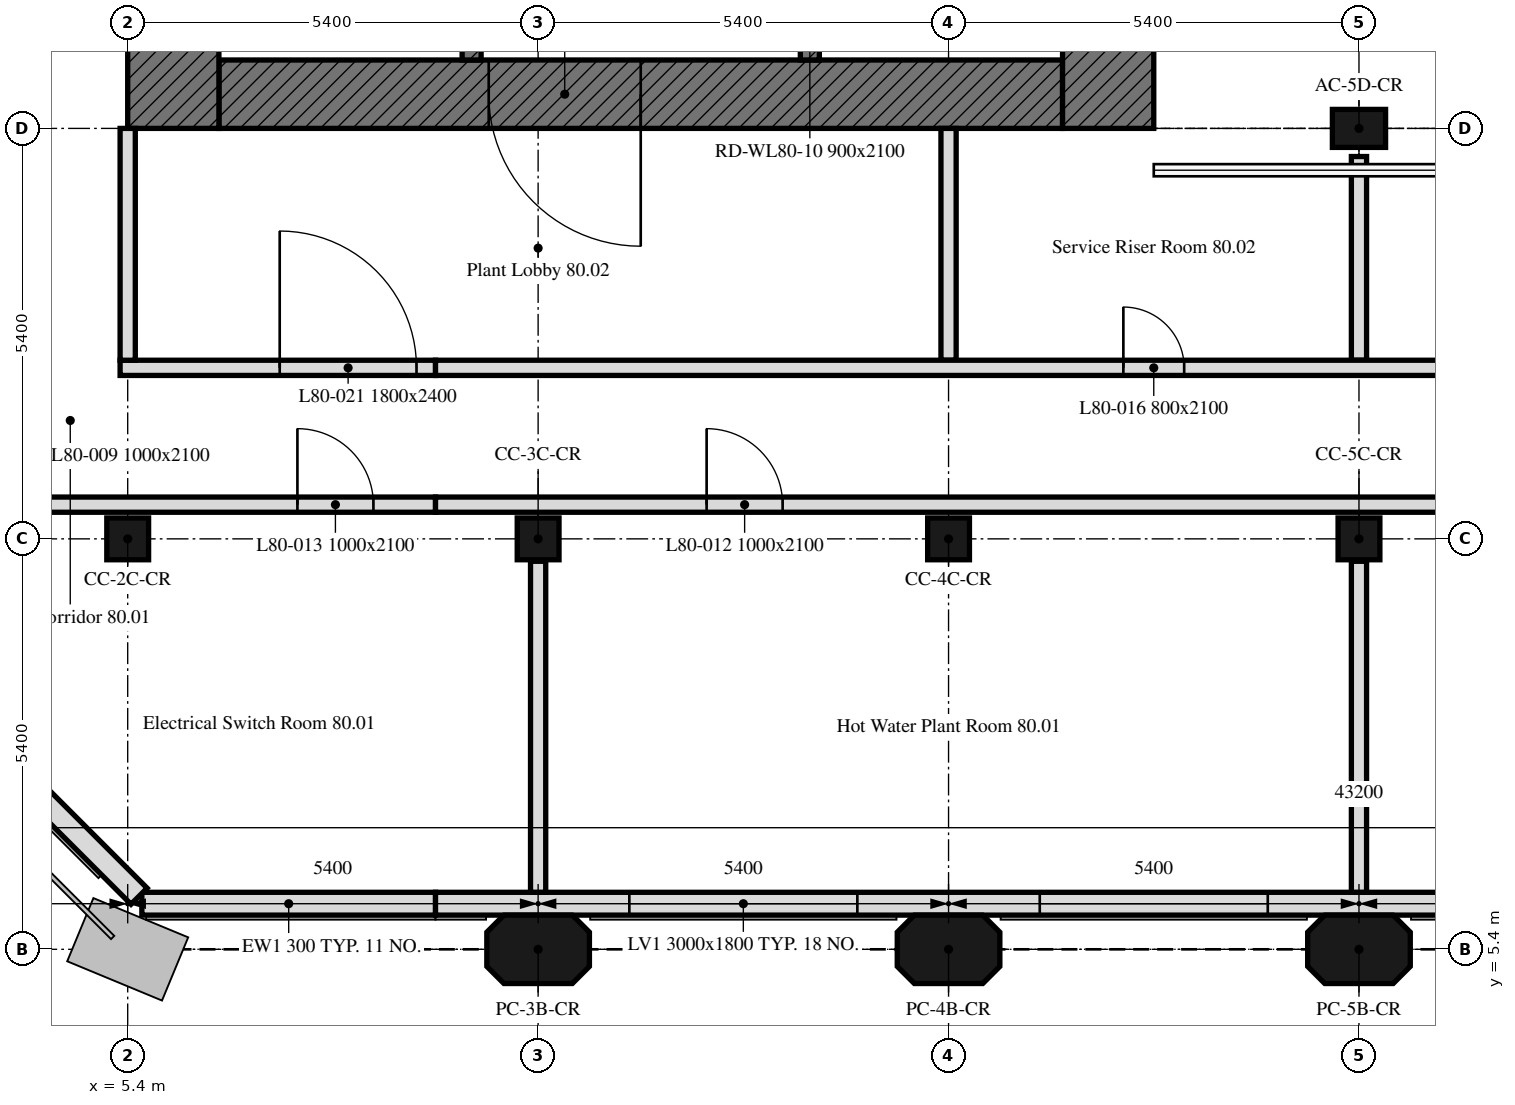
"""IFC4 building model, lengths in metres.
Left out: names, types, materials, properties, quantities, classifications, styles, units other than length and angle.
Written with IfcOpenShell. Run it as: python <this file> out.ifc"""

import sys

from ifc_helpers import new_model, si_unit, direction, frame, frame_2d, origin, origin_2d, place, context, subcontext, project, spatial, polyline, rectangle, outline, extrude, element, fill, save


model = new_model("IFC4")
c1 = context("Model", 3, precision=1e-05, world=origin(), true_north=direction((0.0, 1.0)))
c2 = subcontext(c1, "Body", "Model", "MODEL_VIEW")
j1 = project(units=[si_unit("LENGTHUNIT", "METRE"), si_unit("PLANEANGLEUNIT", "RADIAN")], contexts=[c1])
p1 = place(None, origin())
s1 = spatial("IfcSite", under=j1, at=p1, CompositionType="ELEMENT")
p2 = place(p1, origin())
s2 = spatial("IfcBuilding", under=s1, at=p2, CompositionType="ELEMENT")
p3 = place(p2, frame((0.0, 0.0, 321.7)))
s3 = spatial("IfcBuildingStorey", under=s2, at=p3, CompositionType="ELEMENT", Elevation=321.7)
for number, where, z_axis, x_axis in (
    (1, (10.8, 5.4, 0.0), (0.0, 0.0, 1.0), (1.0, 0.0, 0.0)),
    (2, (16.2, 5.4, 0.0), (0.0, 0.0, 1.0), (1.0, 0.0, 0.0)),
    (3, (21.6, 5.4, 0.0), (0.0, 0.0, 1.0), (1.0, 0.0, 0.0)),
):
    element("IfcColumn", number, at=place(p3, frame(where, z_axis=z_axis, x_axis=x_axis)), inside=s3, PredefinedType="COLUMN", context=c2, shape_type="SweptSolid", body=[
        extrude(outline(polyline([(-0.45, -0.45), (0.45, -0.45), (0.675, -0.225), (0.675, 0.225), (0.45, 0.45), (-0.45, 0.45), (-0.675, 0.225), (-0.675, -0.225), (-0.45, -0.45)])), origin(), (0.0, 0.0, 1.0), 4.2),
    ])
for number, where, z_axis, x_axis in (
    (4, (5.4, 10.8, 0.0), (0.0, 0.0, 1.0), (1.0, 0.0, 0.0)),
    (5, (10.8, 10.8, 0.0), (0.0, 0.0, 1.0), (1.0, 0.0, 0.0)),
    (6, (16.2, 10.8, 0.0), (0.0, 0.0, 1.0), (1.0, 0.0, 0.0)),
    (7, (21.6, 10.8, 0.0), (0.0, 0.0, 1.0), (1.0, 0.0, 0.0)),
):
    element("IfcColumn", number, at=place(p3, frame(where, z_axis=z_axis, x_axis=x_axis)), inside=s3, PredefinedType="COLUMN", context=c2, shape_type="SweptSolid", body=[
        extrude(rectangle(XDim=0.55, YDim=0.55, at=origin_2d()), origin(), (0.0, 0.0, 1.0), 4.2),
    ])
p4 = place(p3, frame((21.6, 16.2, 0.0), z_axis=(0.0, 0.0, 1.0), x_axis=(1.0, 0.0, 0.0)))
e8 = element("IfcColumn", 8, at=p4, inside=s3, PredefinedType="COLUMN", context=c2, shape_type="SweptSolid", body=[
    extrude(rectangle(XDim=0.7, YDim=0.5, at=origin_2d()), origin(), (0.0, 0.0, 1.0), 4.2),
])
p5 = place(p3, frame((5.586, 6.0, 0.0), z_axis=(0.0, 0.0, 1.0), x_axis=(1.0, 0.0, 0.0)))
e9 = element("IfcWall", 9, at=p5, inside=s3, PredefinedType="SOLIDWALL", context=c2, shape_type="SweptSolid", body=[
    extrude(outline(polyline([(0.0, 0.0), (3.864, 0.0), (3.864, 4.2), (3.312, 6.955), (2.76, 6.709), (2.208, 6.464), (1.656, 6.219), (1.104, 5.973), (0.552, 5.728), (0.0, 5.483), (0.0, 0.0)])), frame((0.0, 0.15, 0.0), z_axis=(0.0, -1.0, 0.0), x_axis=(1.0, 0.0, 0.0)), (0.0, 0.0, 1.0), 0.3),
])
p6 = place(p3, frame((9.45, 6.0, 0.0), z_axis=(0.0, 0.0, 1.0), x_axis=(1.0, 0.0, 0.0)))
e10 = element("IfcWall", 10, at=p6, inside=s3, PredefinedType="SOLIDWALL", context=c2, shape_type="SweptSolid", body=[
    extrude(outline(polyline([(0.0, 0.0), (28.164, 0.0), (28.164, 4.2), (27.564, 4.2), (26.965, 4.2), (26.366, 4.2), (25.767, 4.2), (25.167, 4.2), (24.568, 4.2), (23.969, 4.2), (23.37, 4.2), (22.771, 4.2), (22.171, 4.2), (21.572, 4.2), (20.973, 4.2), (20.374, 4.2), (19.774, 4.2), (19.175, 4.2), (18.576, 4.2), (17.977, 4.2), (17.377, 4.2), (16.778, 4.2), (16.179, 4.2), (15.58, 4.2), (14.981, 4.2), (14.381, 4.2), (13.782, 4.2), (13.183, 4.2), (12.584, 4.2), (11.985, 4.2), (11.385, 4.2), (10.786, 4.2), (10.187, 4.2), (9.588, 4.2), (8.988, 4.2), (8.389, 4.2), (7.79, 4.2), (7.191, 4.2), (6.592, 4.2), (5.992, 4.2), (5.393, 4.2), (4.794, 4.2), (4.195, 4.2), (3.595, 4.2), (2.996, 4.2), (2.397, 4.2), (1.798, 4.2), (1.198, 4.2), (0.599, 4.2), (0.0, 4.2), (0.0, 0.0)])), frame((0.0, 0.15, 0.0), z_axis=(0.0, -1.0, 0.0), x_axis=(1.0, 0.0, 0.0)), (0.0, 0.0, 1.0), 0.3),
])
p7 = place(p6, frame((2.55, 0.0, 0.6)))
e11 = element("IfcOpeningElement", 11, at=p7, cuts=e10, PredefinedType="OPENING", context=c2, shape_type="SweptSolid", body=[
    extrude(rectangle(XDim=3.0, YDim=1.8, at=frame_2d((1.5, 0.9))), frame((0.0, 0.16, 0.0), z_axis=(0.0, -1.0, 0.0), x_axis=(1.0, 0.0, 0.0)), (0.0, 0.0, 1.0), 0.32),
])
p8 = place(p6, frame((7.95, 0.0, 0.6)))
e12 = element("IfcOpeningElement", 12, at=p8, cuts=e10, PredefinedType="OPENING", context=c2, shape_type="SweptSolid", body=[
    extrude(rectangle(XDim=3.0, YDim=1.8, at=frame_2d((1.5, 0.9))), frame((0.0, 0.16, 0.0), z_axis=(0.0, -1.0, 0.0), x_axis=(1.0, 0.0, 0.0)), (0.0, 0.0, 1.0), 0.32),
])
p9 = place(p6, frame((13.35, 0.0, 0.6)))
e13 = element("IfcOpeningElement", 13, at=p9, cuts=e10, PredefinedType="OPENING", context=c2, shape_type="SweptSolid", body=[
    extrude(rectangle(XDim=3.0, YDim=1.8, at=frame_2d((1.5, 0.9))), frame((0.0, 0.16, 0.0), z_axis=(0.0, -1.0, 0.0), x_axis=(1.0, 0.0, 0.0)), (0.0, 0.0, 1.0), 0.32),
])
p10 = place(p6, frame((18.75, 0.0, 0.6)))
e14 = element("IfcOpeningElement", 14, at=p10, cuts=e10, PredefinedType="OPENING", context=c2, shape_type="SweptSolid", body=[
    extrude(rectangle(XDim=3.0, YDim=1.8, at=frame_2d((1.5, 0.9))), frame((0.0, 0.16, 0.0), z_axis=(0.0, -1.0, 0.0), x_axis=(1.0, 0.0, 0.0)), (0.0, 0.0, 1.0), 0.32),
])
p11 = place(p6, frame((24.15, 0.0, 0.6)))
e15 = element("IfcOpeningElement", 15, at=p11, cuts=e10, PredefinedType="OPENING", context=c2, shape_type="SweptSolid", body=[
    extrude(rectangle(XDim=3.0, YDim=1.8, at=frame_2d((1.5, 0.9))), frame((0.0, 0.16, 0.0), z_axis=(0.0, -1.0, 0.0), x_axis=(1.0, 0.0, 0.0)), (0.0, 0.0, 1.0), 0.32),
])
p12 = place(p3, frame((0.699, 10.949, 0.0), z_axis=(0.0, 0.0, 1.0), x_axis=(0.707106781187, -0.707106781187, 0.0)))
e16 = element("IfcWall", 16, at=p12, inside=s3, PredefinedType="SOLIDWALL", context=c2, shape_type="SweptSolid", body=[
    extrude(outline(polyline([(0.0, 0.0), (6.86, 0.0), (6.86, 5.467), (6.288, 5.287), (5.716, 5.107), (5.145, 4.927), (4.573, 4.748), (4.001, 4.568), (3.43, 4.389), (2.858, 4.209), (2.287, 4.029), (1.715, 3.85), (1.143, 3.67), (0.572, 3.49), (0.0, 3.311), (0.0, 0.0)])), frame((0.0, 0.15, 0.0), z_axis=(0.0, -1.0, 0.0), x_axis=(1.0, 0.0, 0.0)), (0.0, 0.0, 1.0), 0.3),
])
p13 = place(p3, frame((17.7, 16.65, 0.0), z_axis=(0.0, 0.0, 1.0), x_axis=(-1.0, 0.0, 0.0)))
e17 = element("IfcWall", 17, at=p13, inside=s3, PredefinedType="SOLIDWALL", context=c2, shape_type="SweptSolid", body=[
    extrude(outline(polyline([(0.0, 0.0), (11.1, 0.0), (11.1, 5.933), (0.0, 4.2), (0.0, 0.0)])), frame((0.0, 0.45, 0.0), z_axis=(0.0, -1.0, 0.0), x_axis=(1.0, 0.0, 0.0)), (0.0, 0.0, 1.0), 0.9),
])
p14 = place(p13, frame((5.55, 0.0, 0.0)))
e18 = element("IfcOpeningElement", 18, at=p14, cuts=e17, PredefinedType="OPENING", context=c2, shape_type="SweptSolid", body=[
    extrude(rectangle(XDim=2.0, YDim=2.4, at=frame_2d((1.0, 1.2))), frame((0.0, 0.45, 0.0), z_axis=(0.0, -1.0, 0.0), x_axis=(1.0, 0.0, 0.0)), (0.0, 0.0, 1.0), 0.9),
])
p15 = place(p3, frame((6.0, 16.2, 0.0), z_axis=(0.0, 0.0, 1.0), x_axis=(0.0, 1.0, 0.0)))
e19 = element("IfcWall", 19, at=p15, inside=s3, PredefinedType="SOLIDWALL", context=c2, shape_type="SweptSolid", body=[
    extrude(rectangle(XDim=16.2, YDim=1.2, at=frame_2d((8.1, 0.0))), origin(), (0.0, 0.0, 1.0), 5.667),
])
p16 = place(p3, frame((18.3, 32.4, 0.0), z_axis=(0.0, 0.0, 1.0), x_axis=(0.0, -1.0, 0.0)))
e20 = element("IfcWall", 20, at=p16, inside=s3, PredefinedType="SOLIDWALL", context=c2, shape_type="SweptSolid", body=[
    extrude(rectangle(XDim=16.2, YDim=1.2, at=frame_2d((8.1, 0.0))), origin(), (0.0, 0.0, 1.0), 4.2),
])
p17 = place(p3, frame((9.925, 17.1, 0.0), z_axis=(0.0, 0.0, 1.0), x_axis=(0.0, 1.0, 0.0)))
e21 = element("IfcWall", 21, at=p17, inside=s3, PredefinedType="SOLIDWALL", context=c2, shape_type="SweptSolid", body=[
    extrude(rectangle(XDim=14.4, YDim=0.25, at=frame_2d((7.2, 0.0))), origin(), (0.0, 0.0, 1.0), 4.2),
])
p18 = place(p17, frame((4.6, 0.0, 0.0)))
e22 = element("IfcOpeningElement", 22, at=p18, cuts=e21, PredefinedType="OPENING", context=c2, shape_type="SweptSolid", body=[
    extrude(rectangle(XDim=1.0, YDim=2.1, at=frame_2d((0.5, 1.05))), frame((0.0, 0.125, 0.0), z_axis=(0.0, -1.0, 0.0), x_axis=(1.0, 0.0, 0.0)), (0.0, 0.0, 1.0), 0.25),
])
p19 = place(p17, frame((7.062, 0.0, 0.0)))
e23 = element("IfcOpeningElement", 23, at=p19, cuts=e21, PredefinedType="OPENING", context=c2, shape_type="SweptSolid", body=[
    extrude(rectangle(XDim=1.2, YDim=2.1, at=frame_2d((0.6, 1.05))), frame((0.0, 0.125, 0.0), z_axis=(0.0, -1.0, 0.0), x_axis=(1.0, 0.0, 0.0)), (0.0, 0.0, 1.0), 0.25),
])
p20 = place(p17, frame((10.106, 0.0, 0.0)))
e24 = element("IfcOpeningElement", 24, at=p20, cuts=e21, PredefinedType="OPENING", context=c2, shape_type="SweptSolid", body=[
    extrude(rectangle(XDim=0.9, YDim=2.1, at=frame_2d((0.45, 1.05))), frame((0.0, 0.125, 0.0), z_axis=(0.0, -1.0, 0.0), x_axis=(1.0, 0.0, 0.0)), (0.0, 0.0, 1.0), 0.25),
])
p21 = place(p17, frame((12.719, 0.0, 0.0)))
e25 = element("IfcOpeningElement", 25, at=p21, cuts=e21, PredefinedType="OPENING", context=c2, shape_type="SweptSolid", body=[
    extrude(rectangle(XDim=0.9, YDim=2.1, at=frame_2d((0.45, 1.05))), frame((0.0, 0.125, 0.0), z_axis=(0.0, -1.0, 0.0), x_axis=(1.0, 0.0, 0.0)), (0.0, 0.0, 1.0), 0.25),
])
p22 = place(p3, frame((14.375, 17.1, 0.0), z_axis=(0.0, 0.0, 1.0), x_axis=(0.0, 1.0, 0.0)))
e26 = element("IfcWall", 26, at=p22, inside=s3, PredefinedType="SOLIDWALL", context=c2, shape_type="SweptSolid", body=[
    extrude(rectangle(XDim=14.4, YDim=0.25, at=frame_2d((7.2, 0.0))), origin(), (0.0, 0.0, 1.0), 4.2),
])
p23 = place(p22, frame((13.15, 0.0, 0.0)))
e27 = element("IfcOpeningElement", 27, at=p23, cuts=e26, PredefinedType="OPENING", context=c2, shape_type="SweptSolid", body=[
    extrude(rectangle(XDim=1.0, YDim=2.1, at=frame_2d((0.5, 1.05))), frame((0.0, 0.125, 0.0), z_axis=(0.0, -1.0, 0.0), x_axis=(1.0, 0.0, 0.0)), (0.0, 0.0, 1.0), 0.25),
])
p24 = place(p22, frame((0.24, 0.0, 0.0)))
e28 = element("IfcOpeningElement", 28, at=p24, cuts=e26, PredefinedType="OPENING", context=c2, shape_type="SweptSolid", body=[
    extrude(rectangle(XDim=0.9, YDim=2.1, at=frame_2d((0.45, 1.05))), frame((0.0, 0.125, 0.0), z_axis=(0.0, -1.0, 0.0), x_axis=(1.0, 0.0, 0.0)), (0.0, 0.0, 1.0), 0.25),
])
p25 = place(p22, frame((2.74, 0.0, 0.0)))
e29 = element("IfcOpeningElement", 29, at=p25, cuts=e26, PredefinedType="OPENING", context=c2, shape_type="SweptSolid", body=[
    extrude(rectangle(XDim=0.9, YDim=2.1, at=frame_2d((0.45, 1.05))), frame((0.0, 0.125, 0.0), z_axis=(0.0, -1.0, 0.0), x_axis=(1.0, 0.0, 0.0)), (0.0, 0.0, 1.0), 0.25),
])
p26 = place(p22, frame((6.175, 0.0, 0.0)))
e30 = element("IfcOpeningElement", 30, at=p26, cuts=e26, PredefinedType="OPENING", context=c2, shape_type="SweptSolid", body=[
    extrude(rectangle(XDim=0.9, YDim=2.1, at=frame_2d((0.45, 1.05))), frame((0.0, 0.125, 0.0), z_axis=(0.0, -1.0, 0.0), x_axis=(1.0, 0.0, 0.0)), (0.0, 0.0, 1.0), 0.25),
])
for number, where, z_axis, x_axis in (
    (31, (21.6, 10.505, 0.0), (0.0, 0.0, 1.0), (0.0, -1.0, 0.0)),
    (32, (10.8, 10.505, 0.0), (0.0, 0.0, 1.0), (0.0, -1.0, 0.0)),
):
    element("IfcWall", number, at=place(p3, frame(where, z_axis=z_axis, x_axis=x_axis)), inside=s3, PredefinedType="PARTITIONING", context=c2, shape_type="SweptSolid", body=[
        extrude(rectangle(XDim=4.354, YDim=0.2, at=frame_2d((2.177, 0.0))), origin(), (0.0, 0.0, 1.0), 4.2),
    ])
p27 = place(p3, frame((0.751, 11.25, 0.0), z_axis=(0.0, 0.0, 1.0), x_axis=(1.0, 0.0, 0.0)))
e33 = element("IfcWall", 33, at=p27, inside=s3, PredefinedType="PARTITIONING", context=c2, shape_type="SweptSolid", body=[
    extrude(outline(polyline([(0.0, 0.0), (8.699, 0.0), (8.699, 4.2), (0.0, 3.334), (0.0, 0.0)])), frame((0.0, 0.1, 0.0), z_axis=(0.0, -1.0, 0.0), x_axis=(1.0, 0.0, 0.0)), (0.0, 0.0, 1.0), 0.2),
])
p28 = place(p27, frame((6.882, 0.0, 0.0)))
e34 = element("IfcOpeningElement", 34, at=p28, cuts=e33, PredefinedType="OPENING", context=c2, shape_type="SweptSolid", body=[
    extrude(rectangle(XDim=1.0, YDim=2.1, at=frame_2d((0.5, 1.05))), frame((0.0, 0.1, 0.0), z_axis=(0.0, -1.0, 0.0), x_axis=(1.0, 0.0, 0.0)), (0.0, 0.0, 1.0), 0.2),
])
p29 = place(p3, frame((9.45, 11.25, 0.0), z_axis=(0.0, 0.0, 1.0), x_axis=(1.0, 0.0, 0.0)))
e35 = element("IfcWall", 35, at=p29, inside=s3, PredefinedType="PARTITIONING", context=c2, shape_type="SweptSolid", body=[
    extrude(rectangle(XDim=32.999, YDim=0.2, at=frame_2d((16.5, 0.0))), origin(), (0.0, 0.0, 1.0), 4.2),
])
p30 = place(p29, frame((25.167, 0.0, 0.0)))
e36 = element("IfcOpeningElement", 36, at=p30, cuts=e35, PredefinedType="OPENING", context=c2, shape_type="SweptSolid", body=[
    extrude(rectangle(XDim=1.0, YDim=2.1, at=frame_2d((0.5, 1.05))), frame((0.0, 0.1, 0.0), z_axis=(0.0, -1.0, 0.0), x_axis=(1.0, 0.0, 0.0)), (0.0, 0.0, 1.0), 0.2),
])
p31 = place(p29, frame((19.733, 0.0, 0.0)))
e37 = element("IfcOpeningElement", 37, at=p31, cuts=e35, PredefinedType="OPENING", context=c2, shape_type="SweptSolid", body=[
    extrude(rectangle(XDim=1.0, YDim=2.1, at=frame_2d((0.5, 1.05))), frame((0.0, 0.1, 0.0), z_axis=(0.0, -1.0, 0.0), x_axis=(1.0, 0.0, 0.0)), (0.0, 0.0, 1.0), 0.2),
])
p32 = place(p29, frame((3.567, 0.0, 0.0)))
e38 = element("IfcOpeningElement", 38, at=p32, cuts=e35, PredefinedType="OPENING", context=c2, shape_type="SweptSolid", body=[
    extrude(rectangle(XDim=1.0, YDim=2.1, at=frame_2d((0.5, 1.05))), frame((0.0, 0.1, 0.0), z_axis=(0.0, -1.0, 0.0), x_axis=(1.0, 0.0, 0.0)), (0.0, 0.0, 1.0), 0.2),
])
p33 = place(p3, frame((21.6, 15.83, 0.0), z_axis=(0.0, 0.0, 1.0), x_axis=(0.0, -1.0, 0.0)))
e39 = element("IfcWall", 39, at=p33, inside=s3, PredefinedType="PARTITIONING", context=c2, shape_type="SweptSolid", body=[
    extrude(rectangle(XDim=2.68, YDim=0.2, at=frame_2d((1.34, 0.0))), origin(), (0.0, 0.0, 1.0), 4.2),
])
p34 = place(p3, frame((16.2, 16.2, 0.0), z_axis=(0.0, 0.0, 1.0), x_axis=(0.0, -1.0, 0.0)))
e40 = element("IfcWall", 40, at=p34, inside=s3, PredefinedType="PARTITIONING", context=c2, shape_type="SweptSolid", body=[
    extrude(rectangle(XDim=3.05, YDim=0.2, at=frame_2d((1.525, 0.0))), origin(), (0.0, 0.0, 1.0), 4.2),
])
p35 = place(p3, frame((5.3, 13.05, 0.0), z_axis=(0.0, 0.0, 1.0), x_axis=(1.0, 0.0, 0.0)))
e41 = element("IfcWall", 41, at=p35, inside=s3, PredefinedType="PARTITIONING", context=c2, shape_type="SweptSolid", body=[
    extrude(outline(polyline([(0.0, 0.0), (4.15, 0.0), (4.15, 4.2), (0.0, 5.356), (0.0, 0.0)])), frame((0.0, 0.1, 0.0), z_axis=(0.0, -1.0, 0.0), x_axis=(1.0, 0.0, 0.0)), (0.0, 0.0, 1.0), 0.2),
])
p36 = place(p35, frame((2.1, 0.0, 0.0)))
e42 = element("IfcOpeningElement", 42, at=p36, cuts=e41, PredefinedType="OPENING", context=c2, shape_type="SweptSolid", body=[
    extrude(rectangle(XDim=1.8, YDim=2.4, at=frame_2d((0.9, 1.2))), frame((0.0, 0.1, 0.0), z_axis=(0.0, -1.0, 0.0), x_axis=(1.0, 0.0, 0.0)), (0.0, 0.0, 1.0), 0.2),
])
p37 = place(p3, frame((9.45, 13.05, 0.0), z_axis=(0.0, 0.0, 1.0), x_axis=(1.0, 0.0, 0.0)))
e43 = element("IfcWall", 43, at=p37, inside=s3, PredefinedType="PARTITIONING", context=c2, shape_type="SweptSolid", body=[
    extrude(rectangle(XDim=31.899, YDim=0.2, at=frame_2d((15.95, 0.0))), origin(), (0.0, 0.0, 1.0), 4.2),
])
p38 = place(p37, frame((19.75, 0.0, 0.0)))
e44 = element("IfcOpeningElement", 44, at=p38, cuts=e43, PredefinedType="OPENING", context=c2, shape_type="SweptSolid", body=[
    extrude(rectangle(XDim=1.0, YDim=2.1, at=frame_2d((0.5, 1.05))), frame((0.0, 0.1, 0.0), z_axis=(0.0, -1.0, 0.0), x_axis=(1.0, 0.0, 0.0)), (0.0, 0.0, 1.0), 0.2),
])
p39 = place(p37, frame((14.35, 0.0, 0.0)))
e45 = element("IfcOpeningElement", 45, at=p39, cuts=e43, PredefinedType="OPENING", context=c2, shape_type="SweptSolid", body=[
    extrude(rectangle(XDim=1.0, YDim=2.1, at=frame_2d((0.5, 1.05))), frame((0.0, 0.1, 0.0), z_axis=(0.0, -1.0, 0.0), x_axis=(1.0, 0.0, 0.0)), (0.0, 0.0, 1.0), 0.2),
])
p40 = place(p37, frame((9.05, 0.0, 0.0)))
e46 = element("IfcOpeningElement", 46, at=p40, cuts=e43, PredefinedType="OPENING", context=c2, shape_type="SweptSolid", body=[
    extrude(rectangle(XDim=0.8, YDim=2.1, at=frame_2d((0.4, 1.05))), frame((0.0, 0.1, 0.0), z_axis=(0.0, -1.0, 0.0), x_axis=(1.0, 0.0, 0.0)), (0.0, 0.0, 1.0), 0.2),
])
p41 = place(p37, frame((25.35, 0.0, 0.0)))
e47 = element("IfcOpeningElement", 47, at=p41, cuts=e43, PredefinedType="OPENING", context=c2, shape_type="SweptSolid", body=[
    extrude(rectangle(XDim=1.8, YDim=2.4, at=frame_2d((0.9, 1.2))), frame((0.0, 0.1, 0.0), z_axis=(0.0, -1.0, 0.0), x_axis=(1.0, 0.0, 0.0)), (0.0, 0.0, 1.0), 0.2),
])
p42 = place(p3, frame((5.4, 16.2, 0.0), z_axis=(0.0, 0.0, 1.0), x_axis=(0.0, -1.0, 0.0)))
e48 = element("IfcWall", 48, at=p42, inside=s3, PredefinedType="PARTITIONING", context=c2, shape_type="SweptSolid", body=[
    extrude(rectangle(XDim=3.05, YDim=0.2, at=frame_2d((1.525, 0.0))), origin(), (0.0, 0.0, 1.0), 5.4),
])
p43 = place(p7, origin())
e49 = element("IfcWindow", 49, at=p43, inside=s3, PartitioningType="SINGLE_PANEL", PredefinedType="WINDOW", context=c2, shape_type="SweptSolid", body=[
    extrude(rectangle(XDim=3.0, YDim=1.8, at=frame_2d((1.5, 0.9))), frame((0.0, 0.03, 0.0), z_axis=(0.0, -1.0, 0.0), x_axis=(1.0, 0.0, 0.0)), (0.0, 0.0, 1.0), 0.06),
])
fill(e11, e49)
p44 = place(p8, origin())
e50 = element("IfcWindow", 50, at=p44, inside=s3, PartitioningType="SINGLE_PANEL", PredefinedType="WINDOW", context=c2, shape_type="SweptSolid", body=[
    extrude(rectangle(XDim=3.0, YDim=1.8, at=frame_2d((1.5, 0.9))), frame((0.0, 0.03, 0.0), z_axis=(0.0, -1.0, 0.0), x_axis=(1.0, 0.0, 0.0)), (0.0, 0.0, 1.0), 0.06),
])
fill(e12, e50)
p45 = place(p14, origin())
e51 = element("IfcDoor", 51, at=p45, inside=s3, OperationType="DOUBLE_DOOR_SINGLE_SWING", PredefinedType="DOOR", context=c2, shape_type="SweptSolid", body=[
    extrude(rectangle(XDim=2.0, YDim=2.4, at=frame_2d((1.0, 1.2))), frame((0.0, 0.025, 0.0), z_axis=(0.0, -1.0, 0.0), x_axis=(1.0, 0.0, 0.0)), (0.0, 0.0, 1.0), 0.05),
])
fill(e18, e51)
p46 = place(p32, origin())
e52 = element("IfcDoor", 52, at=p46, inside=s3, OperationType="SINGLE_SWING_LEFT", PredefinedType="DOOR", context=c2, shape_type="SweptSolid", body=[
    extrude(rectangle(XDim=1.0, YDim=2.1, at=frame_2d((0.5, 1.05))), frame((0.0, 0.025, 0.0), z_axis=(0.0, -1.0, 0.0), x_axis=(1.0, 0.0, 0.0)), (0.0, 0.0, 1.0), 0.05),
])
fill(e38, e52)
p47 = place(p28, origin())
e53 = element("IfcDoor", 53, at=p47, inside=s3, OperationType="SINGLE_SWING_RIGHT", PredefinedType="DOOR", context=c2, shape_type="SweptSolid", body=[
    extrude(rectangle(XDim=1.0, YDim=2.1, at=frame_2d((0.5, 1.05))), frame((0.0, 0.025, 0.0), z_axis=(0.0, -1.0, 0.0), x_axis=(1.0, 0.0, 0.0)), (0.0, 0.0, 1.0), 0.05),
])
fill(e34, e53)
p48 = place(p40, origin())
e54 = element("IfcDoor", 54, at=p48, inside=s3, OperationType="SINGLE_SWING_LEFT", PredefinedType="DOOR", context=c2, shape_type="SweptSolid", body=[
    extrude(rectangle(XDim=0.8, YDim=2.1, at=frame_2d((0.4, 1.05))), frame((0.0, 0.025, 0.0), z_axis=(0.0, -1.0, 0.0), x_axis=(1.0, 0.0, 0.0)), (0.0, 0.0, 1.0), 0.05),
])
fill(e46, e54)
p49 = place(p36, origin())
e55 = element("IfcDoor", 55, at=p49, inside=s3, OperationType="DOUBLE_DOOR_SINGLE_SWING", PredefinedType="DOOR", context=c2, shape_type="SweptSolid", body=[
    extrude(rectangle(XDim=1.8, YDim=2.4, at=frame_2d((0.9, 1.2))), frame((0.0, 0.025, 0.0), z_axis=(0.0, -1.0, 0.0), x_axis=(1.0, 0.0, 0.0)), (0.0, 0.0, 1.0), 0.05),
])
fill(e42, e55)
save(model, sys.argv[1])
